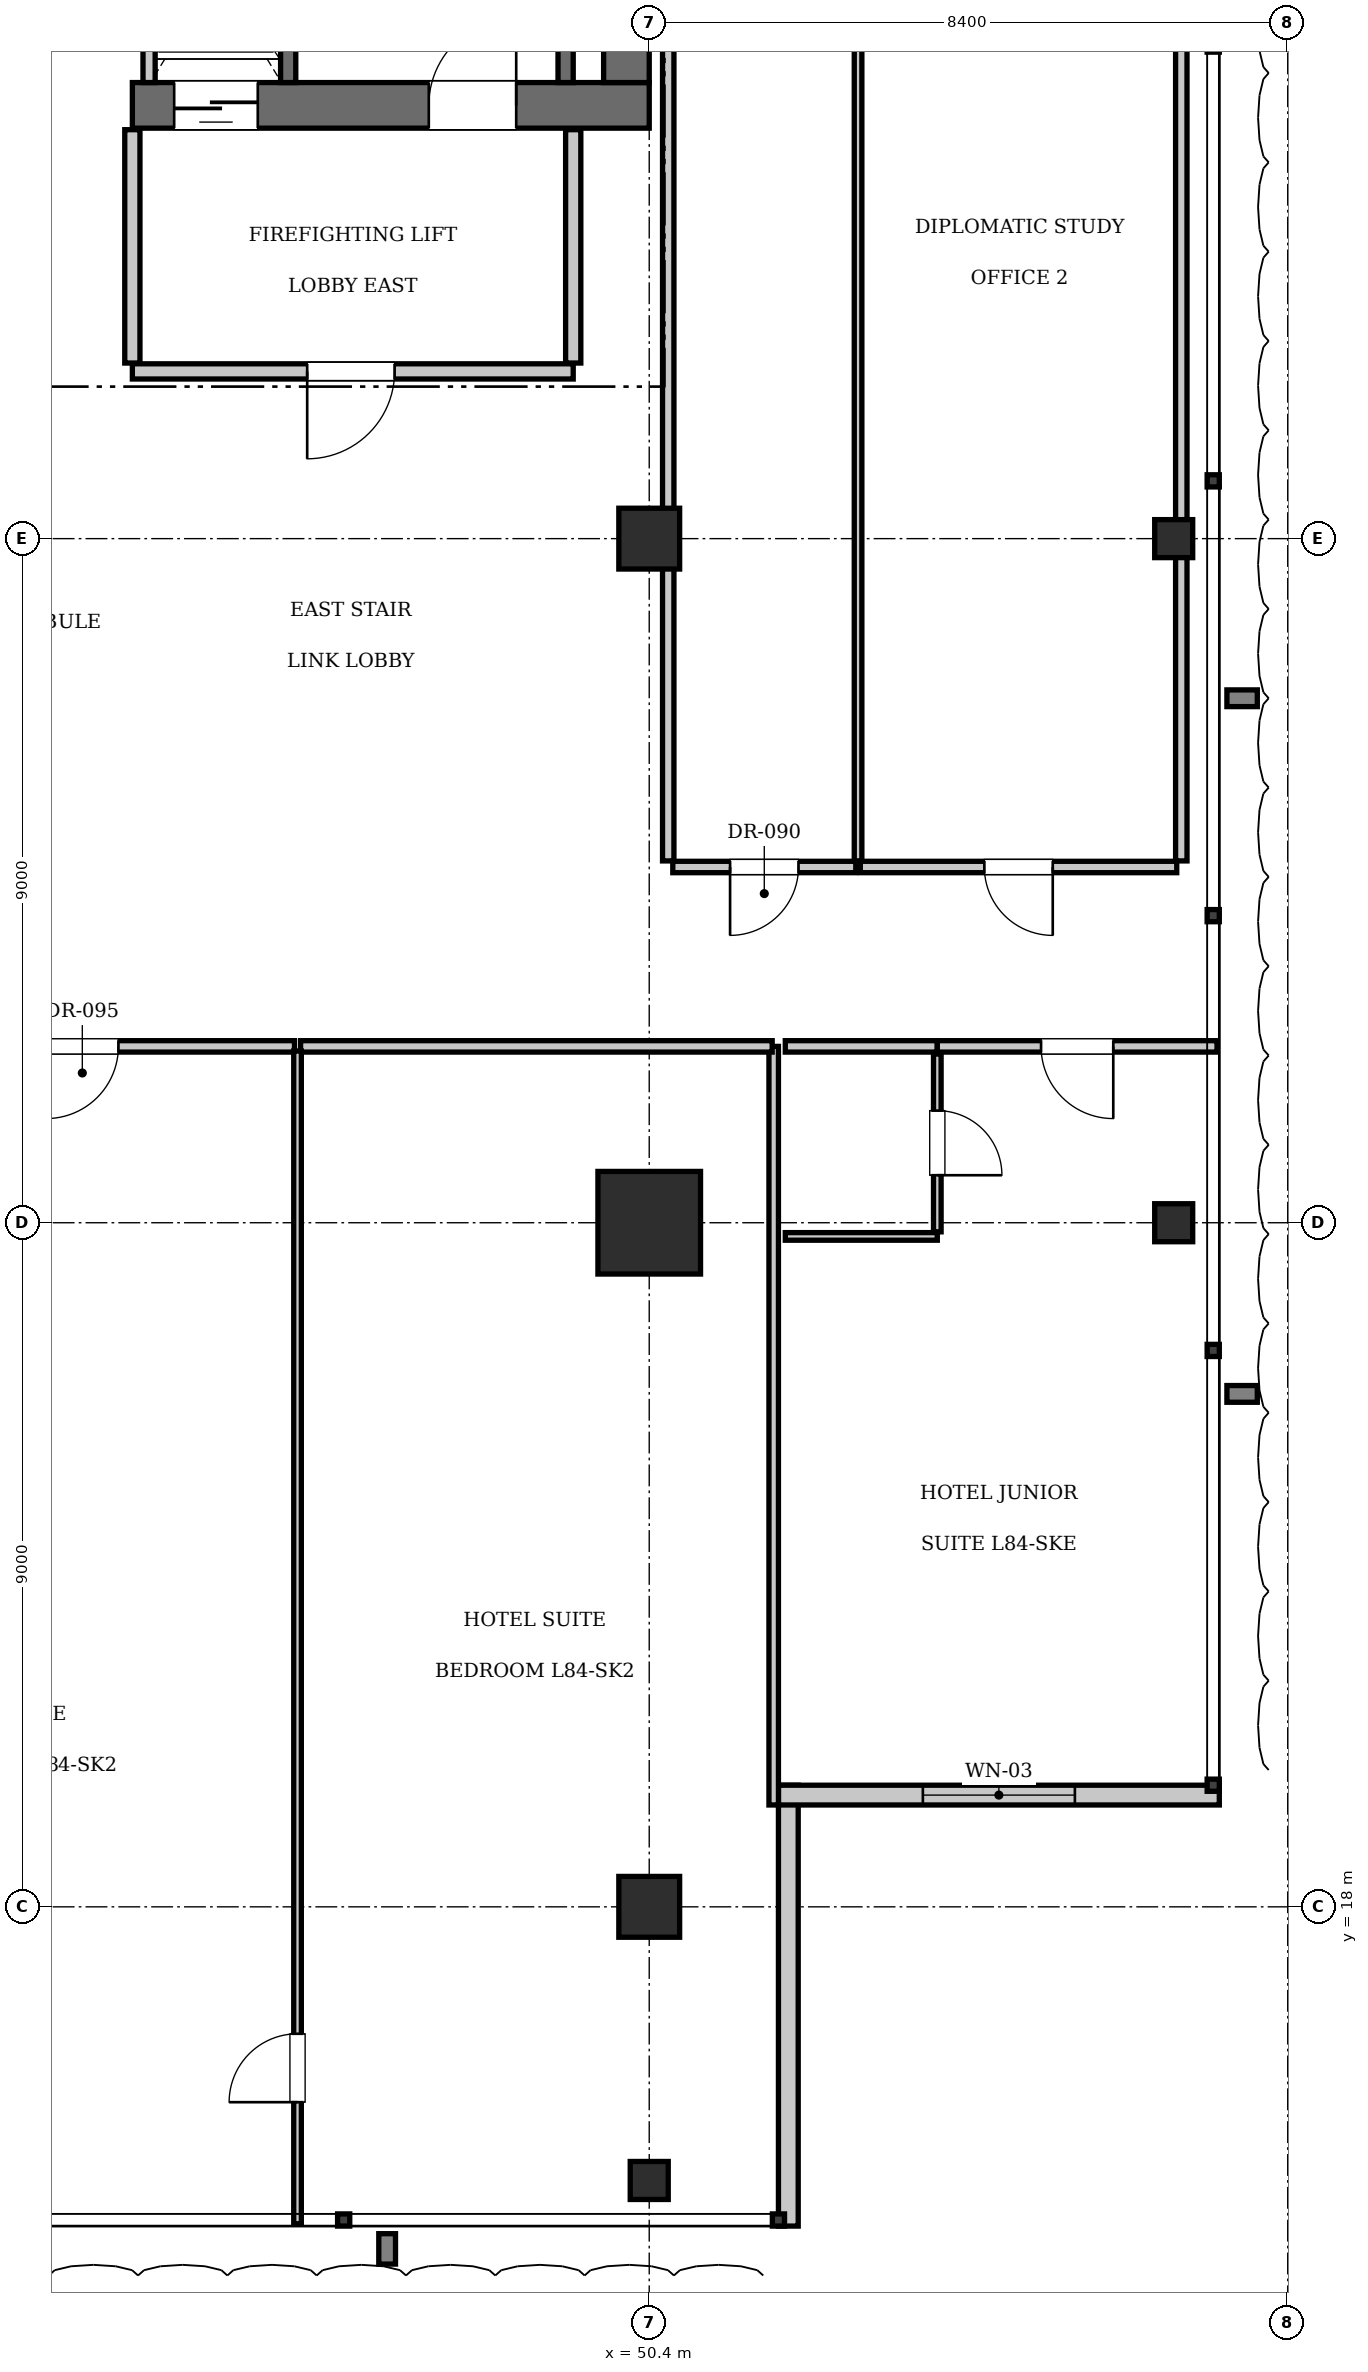
"""IFC4 building model, lengths in metres.
Left out: names, types, materials, properties, quantities, classifications, styles, units other than length and angle.
Written with IfcOpenShell. Run it as: python <this file> out.ifc"""

import sys

from ifc_helpers import new_model, si_unit, direction, frame, frame_2d, origin, origin_2d, place, context, subcontext, project, spatial, rectangle, i_section, extrude, element, fill, save


model = new_model("IFC4")
c1 = context("Model", 3, precision=1e-05, world=origin(), true_north=direction((0.0, 1.0)))
c2 = subcontext(c1, "Body", "Model", "MODEL_VIEW")
j1 = project(units=[si_unit("LENGTHUNIT", "METRE"), si_unit("PLANEANGLEUNIT", "RADIAN")], contexts=[c1])
p1 = place(None, origin())
s1 = spatial("IfcSite", under=j1, at=p1, CompositionType="ELEMENT")
p2 = place(p1, origin())
s2 = spatial("IfcBuilding", under=s1, at=p2, CompositionType="ELEMENT")
p3 = place(p2, frame((0.0, 0.0, 341.25)))
s3 = spatial("IfcBuildingStorey", under=s2, at=p3, CompositionType="ELEMENT", Elevation=341.25)
p4 = place(p3, frame((50.4, 27.0, 0.0), z_axis=(0.0, 0.0, 1.0), x_axis=(1.0, 0.0, 0.0)))
e1 = element("IfcColumn", 1, at=p4, inside=s3, PredefinedType="COLUMN", context=c2, shape_type="SweptSolid", body=[
    extrude(rectangle(XDim=1.35, YDim=1.35, at=origin_2d()), origin(), (0.0, 0.0, 1.0), 3.85),
])
p5 = place(p3, frame((43.6, 41.7, 0.0), z_axis=(0.0, 0.0, 1.0), x_axis=(1.0, 0.0, 0.0)))
e2 = element("IfcWall", 2, at=p5, inside=s3, PredefinedType="SHEAR", context=c2, shape_type="SweptSolid", body=[
    extrude(rectangle(XDim=6.8, YDim=0.6, at=frame_2d((3.4, 0.0))), origin(), (0.0, 0.0, 1.0), 3.85),
])
p6 = place(p5, frame((3.9, 0.0, 0.0)))
e3 = element("IfcOpeningElement", 3, at=p6, cuts=e2, PredefinedType="OPENING", context=c2, shape_type="SweptSolid", body=[
    extrude(rectangle(XDim=1.15, YDim=2.15, at=frame_2d((0.575, 1.075))), frame((0.0, 0.31, 0.0), z_axis=(0.0, -1.0, 0.0), x_axis=(1.0, 0.0, 0.0)), (0.0, 0.0, 1.0), 0.62),
])
p7 = place(p5, frame((0.55, 0.0, 0.0)))
e4 = element("IfcOpeningElement", 4, at=p7, cuts=e2, PredefinedType="OPENING", context=c2, shape_type="SweptSolid", body=[
    extrude(rectangle(XDim=1.1, YDim=2.2, at=frame_2d((0.55, 1.1))), frame((0.0, 0.31, 0.0), z_axis=(0.0, -1.0, 0.0), x_axis=(1.0, 0.0, 0.0)), (0.0, 0.0, 1.0), 0.62),
])
p8 = place(p3, frame((50.1, 42.0, 0.0), z_axis=(0.0, 0.0, 1.0), x_axis=(0.0, 1.0, 0.0)))
e5 = element("IfcWall", 5, at=p8, inside=s3, PredefinedType="SHEAR", context=c2, shape_type="SweptSolid", body=[
    extrude(rectangle(XDim=2.325, YDim=0.6, at=frame_2d((1.163, 0.0))), origin(), (0.0, 0.0, 1.0), 3.85),
])
for number, where, z_axis, x_axis in (
    (6, (50.4, 36.0, 0.0), (0.0, 0.0, 1.0), (1.0, 0.0, 0.0)),
    (7, (50.4, 18.0, 0.0), (0.0, 0.0, 1.0), (1.0, 0.0, 0.0)),
):
    element("IfcColumn", number, at=place(p3, frame(where, z_axis=z_axis, x_axis=x_axis)), inside=s3, PredefinedType="COLUMN", context=c2, shape_type="SweptSolid", body=[
        extrude(rectangle(XDim=0.8, YDim=0.8, at=origin_2d()), origin(), (0.0, 0.0, 1.0), 3.85),
    ])
for number, where, z_axis, x_axis in (
    (8, (57.3, 27.0, 0.0), (0.0, 0.0, 1.0), (1.0, 0.0, 0.0)),
    (9, (57.3, 36.0, 0.0), (0.0, 0.0, 1.0), (1.0, 0.0, 0.0)),
    (10, (50.4, 14.4, 0.0), (0.0, 0.0, 1.0), (1.0, 0.0, 0.0)),
):
    element("IfcColumn", number, at=place(p3, frame(where, z_axis=z_axis, x_axis=x_axis)), inside=s3, PredefinedType="COLUMN", context=c2, shape_type="SweptSolid", body=[
        extrude(i_section(OverallWidth=0.5, OverallDepth=0.5, WebThickness=0.022, FlangeThickness=0.032, at=origin_2d()), origin(), (0.0, 0.0, 1.0), 3.85),
    ])
p9 = place(p3, frame((45.65, 42.0, 0.0), z_axis=(0.0, 0.0, 1.0), x_axis=(0.0, 1.0, 0.0)))
e11 = element("IfcWall", 11, at=p9, inside=s3, PredefinedType="SOLIDWALL", context=c2, shape_type="SweptSolid", body=[
    extrude(rectangle(XDim=9.15, YDim=0.2, at=frame_2d((4.575, 0.0))), origin(), (0.0, 0.0, 1.0), 3.61),
])
p10 = place(p3, frame((49.3, 42.0, 0.0), z_axis=(0.0, 0.0, 1.0), x_axis=(0.0, 1.0, 0.0)))
e12 = element("IfcWall", 12, at=p10, inside=s3, PredefinedType="SOLIDWALL", context=c2, shape_type="SweptSolid", body=[
    extrude(rectangle(XDim=9.12, YDim=0.2, at=frame_2d((4.56, 0.0))), origin(), (0.0, 0.0, 1.0), 3.61),
])
p11 = place(p3, frame((43.82, 42.0, 0.0), z_axis=(0.0, 0.0, 1.0), x_axis=(0.0, 1.0, 0.0)))
e13 = element("IfcWall", 13, at=p11, inside=s3, PredefinedType="SOLIDWALL", context=c2, shape_type="SweptSolid", body=[
    extrude(rectangle(XDim=2.74, YDim=0.16, at=frame_2d((1.37, 0.0))), origin(), (0.0, 0.0, 1.0), 3.61),
])
p12 = place(p3, frame((52.23, 19.6, 0.0), z_axis=(0.0, 0.0, 1.0), x_axis=(0.0, -1.0, 0.0)))
e14 = element("IfcWall", 14, at=p12, inside=s3, PredefinedType="SOLIDWALL", context=c2, shape_type="SweptSolid", body=[
    extrude(rectangle(XDim=5.8, YDim=0.26, at=frame_2d((2.9, 0.0))), origin(), (0.0, 0.0, 1.0), 3.61),
])
p13 = place(p3, frame((57.9, 19.47, 0.0), z_axis=(0.0, 0.0, 1.0), x_axis=(-1.0, 0.0, 0.0)))
e15 = element("IfcWall", 15, at=p13, inside=s3, PredefinedType="SOLIDWALL", context=c2, shape_type="SweptSolid", body=[
    extrude(rectangle(XDim=5.8, YDim=0.26, at=frame_2d((2.9, 0.0))), origin(), (0.0, 0.0, 1.0), 3.61),
])
p14 = place(p13, frame((1.9, 0.0, 0.9)))
e16 = element("IfcOpeningElement", 16, at=p14, cuts=e15, PredefinedType="OPENING", context=c2, shape_type="SweptSolid", body=[
    extrude(rectangle(XDim=2.0, YDim=2.2, at=frame_2d((1.0, 1.1))), frame((0.0, 0.14, 0.0), z_axis=(0.0, -1.0, 0.0), x_axis=(1.0, 0.0, 0.0)), (0.0, 0.0, 1.0), 0.28),
])
p15 = place(p3, frame((43.6, 38.2, 0.0), z_axis=(0.0, 0.0, 1.0), x_axis=(1.0, 0.0, 0.0)))
e17 = element("IfcWall", 17, at=p15, inside=s3, PredefinedType="PARTITIONING", context=c2, shape_type="SweptSolid", body=[
    extrude(rectangle(XDim=5.8, YDim=0.2, at=frame_2d((2.9, 0.0))), origin(), (0.0, 0.0, 1.0), 3.61),
])
p16 = place(p15, frame((2.3, 0.0, 0.0)))
e18 = element("IfcOpeningElement", 18, at=p16, cuts=e17, PredefinedType="OPENING", context=c2, shape_type="SweptSolid", body=[
    extrude(rectangle(XDim=1.15, YDim=2.15, at=frame_2d((0.575, 1.075))), frame((0.0, 0.11, 0.0), z_axis=(0.0, -1.0, 0.0), x_axis=(1.0, 0.0, 0.0)), (0.0, 0.0, 1.0), 0.22),
])
for number, where, z_axis, x_axis in (
    (19, (43.6, 38.31, 0.0), (0.0, 0.0, 1.0), (0.0, 1.0, 0.0)),
    (20, (49.4, 38.31, 0.0), (0.0, 0.0, 1.0), (0.0, 1.0, 0.0)),
):
    element("IfcWall", number, at=place(p3, frame(where, z_axis=z_axis, x_axis=x_axis)), inside=s3, PredefinedType="PARTITIONING", context=c2, shape_type="SweptSolid", body=[
        extrude(rectangle(XDim=3.07, YDim=0.2, at=frame_2d((1.535, 0.0))), origin(), (0.0, 0.0, 1.0), 3.61),
    ])
p17 = place(p3, frame((50.65, 31.76, 0.0), z_axis=(0.0, 0.0, 1.0), x_axis=(0.0, 1.0, 0.0)))
e21 = element("IfcWall", 21, at=p17, inside=s3, PredefinedType="PARTITIONING", context=c2, shape_type="SweptSolid", body=[
    extrude(rectangle(XDim=16.285, YDim=0.15, at=frame_2d((8.143, 0.0))), origin(), (0.0, 0.0, 1.0), 3.61),
])
p18 = place(p3, frame((57.4, 31.76, 0.0), z_axis=(0.0, 0.0, 1.0), x_axis=(0.0, 1.0, 0.0)))
e22 = element("IfcWall", 22, at=p18, inside=s3, PredefinedType="PARTITIONING", context=c2, shape_type="SweptSolid", body=[
    extrude(rectangle(XDim=16.285, YDim=0.15, at=frame_2d((8.143, 0.0))), origin(), (0.0, 0.0, 1.0), 3.141),
])
p19 = place(p3, frame((50.71, 31.68, 0.0), z_axis=(0.0, 0.0, 1.0), x_axis=(1.0, 0.0, 0.0)))
e23 = element("IfcWall", 23, at=p19, inside=s3, PredefinedType="PARTITIONING", context=c2, shape_type="SweptSolid", body=[
    extrude(rectangle(XDim=2.407, YDim=0.15, at=frame_2d((1.204, 0.0))), origin(), (0.0, 0.0, 1.0), 3.61),
])
p20 = place(p19, frame((0.754, 0.0, 0.0)))
e24 = element("IfcOpeningElement", 24, at=p20, cuts=e23, PredefinedType="OPENING", context=c2, shape_type="SweptSolid", body=[
    extrude(rectangle(XDim=0.9, YDim=2.1, at=frame_2d((0.45, 1.05))), frame((0.0, 0.085, 0.0), z_axis=(0.0, -1.0, 0.0), x_axis=(1.0, 0.0, 0.0)), (0.0, 0.0, 1.0), 0.17),
])
p21 = place(p3, frame((53.147, 31.76, 0.0), z_axis=(0.0, 0.0, 1.0), x_axis=(0.0, 1.0, 0.0)))
e25 = element("IfcWall", 25, at=p21, inside=s3, PredefinedType="PARTITIONING", context=c2, shape_type="SweptSolid", body=[
    extrude(rectangle(XDim=16.285, YDim=0.1, at=frame_2d((8.143, 0.0))), origin(), (0.0, 0.0, 1.0), 3.61),
])
p22 = place(p3, frame((53.177, 31.68, 0.0), z_axis=(0.0, 0.0, 1.0), x_axis=(1.0, 0.0, 0.0)))
e26 = element("IfcWall", 26, at=p22, inside=s3, PredefinedType="PARTITIONING", context=c2, shape_type="SweptSolid", body=[
    extrude(rectangle(XDim=4.163, YDim=0.15, at=frame_2d((2.081, 0.0))), origin(), (0.0, 0.0, 1.0), 3.61),
])
p23 = place(p22, frame((1.631, 0.0, 0.0)))
e27 = element("IfcOpeningElement", 27, at=p23, cuts=e26, PredefinedType="OPENING", context=c2, shape_type="SweptSolid", body=[
    extrude(rectangle(XDim=0.9, YDim=2.1, at=frame_2d((0.45, 1.05))), frame((0.0, 0.085, 0.0), z_axis=(0.0, -1.0, 0.0), x_axis=(1.0, 0.0, 0.0)), (0.0, 0.0, 1.0), 0.17),
])
p24 = place(p3, frame((52.038, 19.34, 0.0), z_axis=(0.0, 0.0, 1.0), x_axis=(0.0, 1.0, 0.0)))
e28 = element("IfcWall", 28, at=p24, inside=s3, PredefinedType="PARTITIONING", context=c2, shape_type="SweptSolid", body=[
    extrude(rectangle(XDim=9.98, YDim=0.125, at=frame_2d((4.99, 0.0))), origin(), (0.0, 0.0, 1.0), 3.61),
])
p25 = place(p3, frame((40.15, 29.32, 0.0), z_axis=(0.0, 0.0, 1.0), x_axis=(1.0, 0.0, 0.0)))
e29 = element("IfcWall", 29, at=p25, inside=s3, PredefinedType="PARTITIONING", context=c2, shape_type="SweptSolid", body=[
    extrude(rectangle(XDim=5.583, YDim=0.15, at=frame_2d((2.792, 0.0))), origin(), (0.0, 0.0, 1.0), 3.61),
])
p26 = place(p25, frame((2.316, 0.0, 0.0)))
e30 = element("IfcOpeningElement", 30, at=p26, cuts=e29, PredefinedType="OPENING", context=c2, shape_type="SweptSolid", body=[
    extrude(rectangle(XDim=0.95, YDim=2.15, at=frame_2d((0.475, 1.075))), frame((0.0, 0.085, 0.0), z_axis=(0.0, -1.0, 0.0), x_axis=(1.0, 0.0, 0.0)), (0.0, 0.0, 1.0), 0.17),
])
p27 = place(p3, frame((45.813, 29.32, 0.0), z_axis=(0.0, 0.0, 1.0), x_axis=(1.0, 0.0, 0.0)))
e31 = element("IfcWall", 31, at=p27, inside=s3, PredefinedType="PARTITIONING", context=c2, shape_type="SweptSolid", body=[
    extrude(rectangle(XDim=6.205, YDim=0.15, at=frame_2d((3.102, 0.0))), origin(), (0.0, 0.0, 1.0), 3.61),
])
p28 = place(p3, frame((45.773, 13.83, 0.0), z_axis=(0.0, 0.0, 1.0), x_axis=(0.0, 1.0, 0.0)))
e32 = element("IfcWall", 32, at=p28, inside=s3, PredefinedType="PARTITIONING", context=c2, shape_type="SweptSolid", body=[
    extrude(rectangle(XDim=15.43, YDim=0.1, at=frame_2d((7.715, 0.0))), origin(), (0.0, 0.0, 1.0), 3.61),
])
p29 = place(p28, frame((1.6, 0.0, 0.0)))
e33 = element("IfcOpeningElement", 33, at=p29, cuts=e32, PredefinedType="OPENING", context=c2, shape_type="SweptSolid", body=[
    extrude(rectangle(XDim=0.9, YDim=2.1, at=frame_2d((0.45, 1.05))), frame((0.0, 0.06, 0.0), z_axis=(0.0, -1.0, 0.0), x_axis=(1.0, 0.0, 0.0)), (0.0, 0.0, 1.0), 0.12),
])
p30 = place(p3, frame((52.19, 29.32, 0.0), z_axis=(0.0, 0.0, 1.0), x_axis=(1.0, 0.0, 0.0)))
e34 = element("IfcWall", 34, at=p30, inside=s3, PredefinedType="PARTITIONING", context=c2, shape_type="SweptSolid", body=[
    extrude(rectangle(XDim=2.0, YDim=0.15, at=frame_2d((1.0, 0.0))), origin(), (0.0, 0.0, 1.0), 3.61),
])
p31 = place(p3, frame((52.19, 26.82, 0.0), z_axis=(0.0, 0.0, 1.0), x_axis=(1.0, 0.0, 0.0)))
e35 = element("IfcWall", 35, at=p31, inside=s3, PredefinedType="PARTITIONING", context=c2, shape_type="SweptSolid", body=[
    extrude(rectangle(XDim=2.0, YDim=0.1, at=frame_2d((1.0, 0.0))), origin(), (0.0, 0.0, 1.0), 3.61),
])
p32 = place(p3, frame((54.19, 26.88, 0.0), z_axis=(0.0, 0.0, 1.0), x_axis=(0.0, 1.0, 0.0)))
e36 = element("IfcWall", 36, at=p32, inside=s3, PredefinedType="PARTITIONING", context=c2, shape_type="SweptSolid", body=[
    extrude(rectangle(XDim=2.34, YDim=0.1, at=frame_2d((1.17, 0.0))), origin(), (0.0, 0.0, 1.0), 3.61),
])
p33 = place(p32, frame((0.745, 0.0, 0.0)))
e37 = element("IfcOpeningElement", 37, at=p33, cuts=e36, PredefinedType="OPENING", context=c2, shape_type="SweptSolid", body=[
    extrude(rectangle(XDim=0.85, YDim=2.1, at=frame_2d((0.425, 1.05))), frame((0.0, 0.06, 0.0), z_axis=(0.0, -1.0, 0.0), x_axis=(1.0, 0.0, 0.0)), (0.0, 0.0, 1.0), 0.12),
])
p34 = place(p3, frame((54.19, 29.32, 0.0), z_axis=(0.0, 0.0, 1.0), x_axis=(1.0, 0.0, 0.0)))
e38 = element("IfcWall", 38, at=p34, inside=s3, PredefinedType="PARTITIONING", context=c2, shape_type="SweptSolid", body=[
    extrude(rectangle(XDim=3.68, YDim=0.15, at=frame_2d((1.84, 0.0))), origin(), (0.0, 0.0, 1.0), 3.61),
])
p35 = place(p34, frame((1.365, 0.0, 0.0)))
e39 = element("IfcOpeningElement", 39, at=p35, cuts=e38, PredefinedType="OPENING", context=c2, shape_type="SweptSolid", body=[
    extrude(rectangle(XDim=0.95, YDim=2.15, at=frame_2d((0.475, 1.075))), frame((0.0, 0.085, 0.0), z_axis=(0.0, -1.0, 0.0), x_axis=(1.0, 0.0, 0.0)), (0.0, 0.0, 1.0), 0.17),
])
p36 = place(p6, origin())
e40 = element("IfcDoor", 40, at=p36, inside=s3, OperationType="SINGLE_SWING_RIGHT", PredefinedType="DOOR", context=c2, shape_type="SweptSolid", body=[
    extrude(rectangle(XDim=1.15, YDim=2.15, at=frame_2d((0.575, 1.075))), frame((0.0, 0.025, 0.0), z_axis=(0.0, -1.0, 0.0), x_axis=(1.0, 0.0, 0.0)), (0.0, 0.0, 1.0), 0.05),
])
fill(e3, e40)
p37 = place(p7, frame((1.1, 0.0, 0.0), z_axis=(0.0, 0.0, 1.0), x_axis=(-1.0, 0.0, 0.0)))
e41 = element("IfcDoor", 41, at=p37, inside=s3, OperationType="SLIDING_TO_LEFT", PredefinedType="DOOR", context=c2, shape_type="SweptSolid", body=[
    extrude(rectangle(XDim=1.1, YDim=2.2, at=frame_2d((0.55, 1.1))), frame((0.0, 0.025, 0.0), z_axis=(0.0, -1.0, 0.0), x_axis=(1.0, 0.0, 0.0)), (0.0, 0.0, 1.0), 0.05),
])
fill(e4, e41)
p38 = place(p14, origin())
e42 = element("IfcWindow", 42, at=p38, inside=s3, PartitioningType="SINGLE_PANEL", PredefinedType="WINDOW", context=c2, shape_type="SweptSolid", body=[
    extrude(rectangle(XDim=2.0, YDim=2.2, at=frame_2d((1.0, 1.1))), frame((0.0, 0.03, 0.0), z_axis=(0.0, -1.0, 0.0), x_axis=(1.0, 0.0, 0.0)), (0.0, 0.0, 1.0), 0.06),
])
fill(e16, e42)
p39 = place(p16, frame((1.15, 0.0, 0.0), z_axis=(0.0, 0.0, 1.0), x_axis=(-1.0, 0.0, 0.0)))
e43 = element("IfcDoor", 43, at=p39, inside=s3, OperationType="SINGLE_SWING_RIGHT", PredefinedType="DOOR", context=c2, shape_type="SweptSolid", body=[
    extrude(rectangle(XDim=1.15, YDim=2.15, at=frame_2d((0.575, 1.075))), frame((0.0, 0.025, 0.0), z_axis=(0.0, -1.0, 0.0), x_axis=(1.0, 0.0, 0.0)), (0.0, 0.0, 1.0), 0.05),
])
fill(e18, e43)
p40 = place(p20, frame((0.9, 0.0, 0.0), z_axis=(0.0, 0.0, 1.0), x_axis=(-1.0, 0.0, 0.0)))
e44 = element("IfcDoor", 44, at=p40, inside=s3, OperationType="SINGLE_SWING_RIGHT", PredefinedType="DOOR", context=c2, shape_type="SweptSolid", body=[
    extrude(rectangle(XDim=0.9, YDim=2.1, at=frame_2d((0.45, 1.05))), frame((0.0, 0.025, 0.0), z_axis=(0.0, -1.0, 0.0), x_axis=(1.0, 0.0, 0.0)), (0.0, 0.0, 1.0), 0.05),
])
fill(e24, e44)
p41 = place(p23, frame((0.9, 0.0, 0.0), z_axis=(0.0, 0.0, 1.0), x_axis=(-1.0, 0.0, 0.0)))
e45 = element("IfcDoor", 45, at=p41, inside=s3, OperationType="SINGLE_SWING_LEFT", PredefinedType="DOOR", context=c2, shape_type="SweptSolid", body=[
    extrude(rectangle(XDim=0.9, YDim=2.1, at=frame_2d((0.45, 1.05))), frame((0.0, 0.025, 0.0), z_axis=(0.0, -1.0, 0.0), x_axis=(1.0, 0.0, 0.0)), (0.0, 0.0, 1.0), 0.05),
])
fill(e27, e45)
p42 = place(p26, frame((0.95, 0.0, 0.0), z_axis=(0.0, 0.0, 1.0), x_axis=(-1.0, 0.0, 0.0)))
e46 = element("IfcDoor", 46, at=p42, inside=s3, OperationType="SINGLE_SWING_RIGHT", PredefinedType="DOOR", context=c2, shape_type="SweptSolid", body=[
    extrude(rectangle(XDim=0.95, YDim=2.15, at=frame_2d((0.475, 1.075))), frame((0.0, 0.025, 0.0), z_axis=(0.0, -1.0, 0.0), x_axis=(1.0, 0.0, 0.0)), (0.0, 0.0, 1.0), 0.05),
])
fill(e30, e46)
p43 = place(p29, origin())
e47 = element("IfcDoor", 47, at=p43, inside=s3, OperationType="SINGLE_SWING_LEFT", PredefinedType="DOOR", context=c2, shape_type="SweptSolid", body=[
    extrude(rectangle(XDim=0.9, YDim=2.1, at=frame_2d((0.45, 1.05))), frame((0.0, 0.025, 0.0), z_axis=(0.0, -1.0, 0.0), x_axis=(1.0, 0.0, 0.0)), (0.0, 0.0, 1.0), 0.05),
])
fill(e33, e47)
p44 = place(p33, frame((0.85, 0.0, 0.0), z_axis=(0.0, 0.0, 1.0), x_axis=(-1.0, 0.0, 0.0)))
e48 = element("IfcDoor", 48, at=p44, inside=s3, OperationType="SINGLE_SWING_RIGHT", PredefinedType="DOOR", context=c2, shape_type="SweptSolid", body=[
    extrude(rectangle(XDim=0.85, YDim=2.1, at=frame_2d((0.425, 1.05))), frame((0.0, 0.025, 0.0), z_axis=(0.0, -1.0, 0.0), x_axis=(1.0, 0.0, 0.0)), (0.0, 0.0, 1.0), 0.05),
])
fill(e37, e48)
p45 = place(p35, frame((0.95, 0.0, 0.0), z_axis=(0.0, 0.0, 1.0), x_axis=(-1.0, 0.0, 0.0)))
e49 = element("IfcDoor", 49, at=p45, inside=s3, OperationType="SINGLE_SWING_LEFT", PredefinedType="DOOR", context=c2, shape_type="SweptSolid", body=[
    extrude(rectangle(XDim=0.95, YDim=2.15, at=frame_2d((0.475, 1.075))), frame((0.0, 0.025, 0.0), z_axis=(0.0, -1.0, 0.0), x_axis=(1.0, 0.0, 0.0)), (0.0, 0.0, 1.0), 0.05),
])
fill(e39, e49)
save(model, sys.argv[1])
